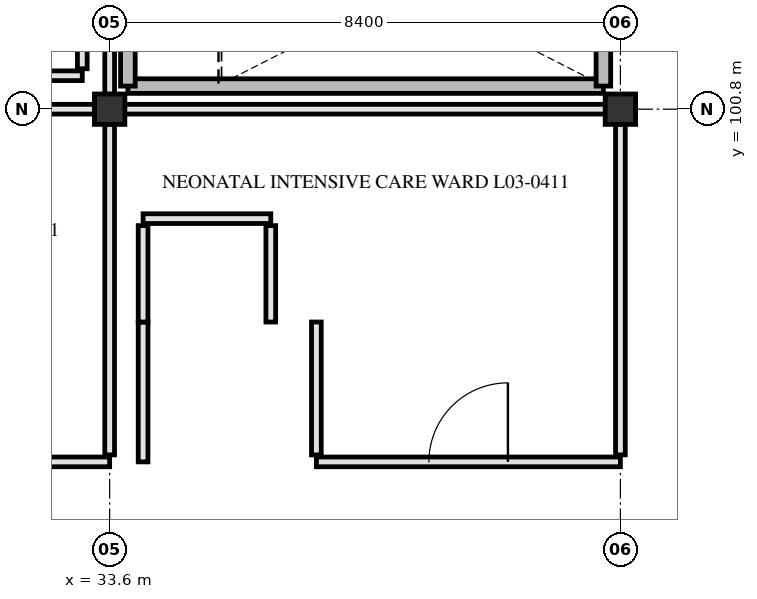
"""IFC4 building model, lengths in metres.
Left out: names, types, materials, properties, quantities, classifications, styles, units other than length and angle.
Written with IfcOpenShell. Run it as: python <this file> out.ifc"""

import sys

from ifc_helpers import new_model, si_unit, direction, frame, frame_2d, origin, origin_2d, place, context, subcontext, project, spatial, rectangle, extrude, element, fill, save


model = new_model("IFC4")
c1 = context("Model", 3, precision=1e-05, world=origin(), true_north=direction((0.0, 1.0)))
c2 = subcontext(c1, "Body", "Model", "MODEL_VIEW")
j1 = project(units=[si_unit("LENGTHUNIT", "METRE"), si_unit("PLANEANGLEUNIT", "RADIAN")], contexts=[c1])
p1 = place(None, origin())
s1 = spatial("IfcSite", under=j1, at=p1, CompositionType="ELEMENT")
p2 = place(p1, origin())
s2 = spatial("IfcBuilding", under=s1, at=p2, CompositionType="ELEMENT")
p3 = place(p2, frame((0.0, 0.0, 14.4)))
s3 = spatial("IfcBuildingStorey", under=s2, at=p3, CompositionType="ELEMENT", Elevation=14.4)
for number, where, z_axis, x_axis in (
    (1, (33.6, 100.8, 0.0), (0.0, 0.0, 1.0), (1.0, 0.0, 0.0)),
    (2, (42.0, 100.8, 0.0), (0.0, 0.0, 1.0), (1.0, 0.0, 0.0)),
):
    element("IfcColumn", number, at=place(p3, frame(where, z_axis=z_axis, x_axis=x_axis)), inside=s3, PredefinedType="COLUMN", context=c2, shape_type="SweptSolid", body=[
        extrude(rectangle(XDim=0.5, YDim=0.5, at=origin_2d()), origin(), (0.0, 0.0, 1.0), 4.2),
    ])
p4 = place(p3, frame((33.9, 101.18, 0.0), z_axis=(0.0, 0.0, 1.0), x_axis=(1.0, 0.0, 0.0)))
e3 = element("IfcWall", 3, at=p4, inside=s3, PredefinedType="SHEAR", context=c2, shape_type="SweptSolid", body=[
    extrude(rectangle(XDim=7.82, YDim=0.24, at=frame_2d((3.91, 0.0))), origin(), (0.0, 0.0, 1.0), 3.9),
])
for number, where, z_axis, x_axis in (
    (4, (33.9, 101.18, 0.0), (0.0, 0.0, 1.0), (0.0, 1.0, 0.0)),
    (5, (41.72, 101.18, 0.0), (0.0, 0.0, 1.0), (0.0, 1.0, 0.0)),
):
    element("IfcWall", number, at=place(p3, frame(where, z_axis=z_axis, x_axis=x_axis)), inside=s3, PredefinedType="SHEAR", context=c2, shape_type="SweptSolid", body=[
        extrude(rectangle(XDim=3.32, YDim=0.24, at=frame_2d((1.66, 0.0))), origin(), (0.0, 0.0, 1.0), 3.9),
    ])
p5 = place(p3, frame((28.6, 95.0, 0.0), z_axis=(0.0, 0.0, 1.0), x_axis=(1.0, 0.0, 0.0)))
e6 = element("IfcWall", 6, at=p5, inside=s3, PredefinedType="PARTITIONING", context=c2, shape_type="SweptSolid", body=[
    extrude(rectangle(XDim=5.0, YDim=0.16, at=frame_2d((2.5, 0.0))), origin(), (0.0, 0.0, 1.0), 3.33),
])
p6 = place(p5, frame((1.7, 0.0, 0.0)))
e7 = element("IfcOpeningElement", 7, at=p6, cuts=e6, PredefinedType="OPENING", context=c2, shape_type="SweptSolid", body=[
    extrude(rectangle(XDim=1.6, YDim=2.25, at=frame_2d((0.8, 1.125))), frame((0.0, 0.09, 0.0), z_axis=(0.0, -1.0, 0.0), x_axis=(1.0, 0.0, 0.0)), (0.0, 0.0, 1.0), 0.18),
])
p7 = place(p3, frame((37.0, 95.0, 0.0), z_axis=(0.0, 0.0, 1.0), x_axis=(1.0, 0.0, 0.0)))
e8 = element("IfcWall", 8, at=p7, inside=s3, PredefinedType="PARTITIONING", context=c2, shape_type="SweptSolid", body=[
    extrude(rectangle(XDim=5.0, YDim=0.16, at=frame_2d((2.5, 0.0))), origin(), (0.0, 0.0, 1.0), 3.33),
])
p8 = place(p7, frame((1.85, 0.0, 0.0)))
e9 = element("IfcOpeningElement", 9, at=p8, cuts=e8, PredefinedType="OPENING", context=c2, shape_type="SweptSolid", body=[
    extrude(rectangle(XDim=1.3, YDim=2.2, at=frame_2d((0.65, 1.1))), frame((0.0, 0.09, 0.0), z_axis=(0.0, -1.0, 0.0), x_axis=(1.0, 0.0, 0.0)), (0.0, 0.0, 1.0), 0.18),
])
p9 = place(p3, frame((34.15, 99.0, 0.0), z_axis=(0.0, 0.0, 1.0), x_axis=(1.0, 0.0, 0.0)))
e10 = element("IfcWall", 10, at=p9, inside=s3, PredefinedType="PARTITIONING", context=c2, shape_type="SweptSolid", body=[
    extrude(rectangle(XDim=2.1, YDim=0.16, at=frame_2d((1.05, 0.0))), origin(), (0.0, 0.0, 1.0), 3.89),
])
for number, where, z_axis, x_axis in (
    (11, (25.445, 100.8, 0.0), (0.0, 0.0, 1.0), (1.0, 0.0, 0.0)),
    (12, (33.845, 100.8, 0.0), (0.0, 0.0, 1.0), (1.0, 0.0, 0.0)),
):
    element("IfcWall", number, at=place(p3, frame(where, z_axis=z_axis, x_axis=x_axis)), inside=s3, PredefinedType="PARTITIONING", context=c2, shape_type="SweptSolid", body=[
        extrude(rectangle(XDim=7.91, YDim=0.16, at=frame_2d((3.955, 0.0))), origin(), (0.0, 0.0, 1.0), 3.28),
    ])
p10 = place(p3, frame((31.15, 101.35, 0.0), z_axis=(0.0, 0.0, 1.0), x_axis=(1.0, 0.0, 0.0)))
e13 = element("IfcWall", 13, at=p10, inside=s3, PredefinedType="PARTITIONING", context=c2, shape_type="SweptSolid", body=[
    extrude(rectangle(XDim=2.0, YDim=0.16, at=frame_2d((1.0, 0.0))), origin(), (0.0, 0.0, 1.0), 3.89),
])
p11 = place(p3, frame((33.15, 101.465, 0.0), z_axis=(0.0, 0.0, 1.0), x_axis=(0.0, 1.0, 0.0)))
e14 = element("IfcWall", 14, at=p11, inside=s3, PredefinedType="PARTITIONING", context=c2, shape_type="SweptSolid", body=[
    extrude(rectangle(XDim=5.135, YDim=0.16, at=frame_2d((2.567, 0.0))), origin(), (0.0, 0.0, 1.0), 3.89),
])
p12 = place(p3, frame((33.6, 95.115, 0.0), z_axis=(0.0, 0.0, 1.0), x_axis=(0.0, 1.0, 0.0)))
e15 = element("IfcWall", 15, at=p12, inside=s3, PredefinedType="PARTITIONING", context=c2, shape_type="SweptSolid", body=[
    extrude(rectangle(XDim=5.44, YDim=0.16, at=frame_2d((2.72, 0.0))), origin(), (0.0, 0.0, 1.0), 3.33),
])
p13 = place(p3, frame((33.6, 101.045, 0.0), z_axis=(0.0, 0.0, 1.0), x_axis=(0.0, 1.0, 0.0)))
e16 = element("IfcWall", 16, at=p13, inside=s3, PredefinedType="PARTITIONING", context=c2, shape_type="SweptSolid", body=[
    extrude(rectangle(XDim=5.555, YDim=0.16, at=frame_2d((2.778, 0.0))), origin(), (0.0, 0.0, 1.0), 3.33),
])
p14 = place(p3, frame((34.15, 95.0, 0.0), z_axis=(0.0, 0.0, 1.0), x_axis=(0.0, 1.0, 0.0)))
e17 = element("IfcWall", 17, at=p14, inside=s3, PredefinedType="PARTITIONING", context=c2, shape_type="SweptSolid", body=[
    extrude(rectangle(XDim=2.3, YDim=0.16, at=frame_2d((1.15, 0.0))), origin(), (0.0, 0.0, 1.0), 3.89),
])
for number, where, z_axis, x_axis in (
    (18, (34.15, 97.3, 0.0), (0.0, 0.0, 1.0), (0.0, 1.0, 0.0)),
    (19, (36.25, 97.3, 0.0), (0.0, 0.0, 1.0), (0.0, 1.0, 0.0)),
):
    element("IfcWall", number, at=place(p3, frame(where, z_axis=z_axis, x_axis=x_axis)), inside=s3, PredefinedType="PARTITIONING", context=c2, shape_type="SweptSolid", body=[
        extrude(rectangle(XDim=1.585, YDim=0.16, at=frame_2d((0.792, 0.0))), origin(), (0.0, 0.0, 1.0), 3.89),
    ])
p15 = place(p3, frame((37.0, 95.115, 0.0), z_axis=(0.0, 0.0, 1.0), x_axis=(0.0, 1.0, 0.0)))
e20 = element("IfcWall", 20, at=p15, inside=s3, PredefinedType="PARTITIONING", context=c2, shape_type="SweptSolid", body=[
    extrude(rectangle(XDim=2.185, YDim=0.16, at=frame_2d((1.093, 0.0))), origin(), (0.0, 0.0, 1.0), 3.89),
])
p16 = place(p3, frame((42.0, 95.115, 0.0), z_axis=(0.0, 0.0, 1.0), x_axis=(0.0, 1.0, 0.0)))
e21 = element("IfcWall", 21, at=p16, inside=s3, PredefinedType="PARTITIONING", context=c2, shape_type="SweptSolid", body=[
    extrude(rectangle(XDim=5.44, YDim=0.16, at=frame_2d((2.72, 0.0))), origin(), (0.0, 0.0, 1.0), 3.33),
])
p17 = place(p8, origin())
e22 = element("IfcDoor", 22, at=p17, inside=s3, OperationType="SINGLE_SWING_RIGHT", PredefinedType="DOOR", context=c2, shape_type="SweptSolid", body=[
    extrude(rectangle(XDim=1.3, YDim=2.2, at=frame_2d((0.65, 1.1))), frame((0.0, 0.025, 0.0), z_axis=(0.0, -1.0, 0.0), x_axis=(1.0, 0.0, 0.0)), (0.0, 0.0, 1.0), 0.05),
])
fill(e9, e22)
save(model, sys.argv[1])
